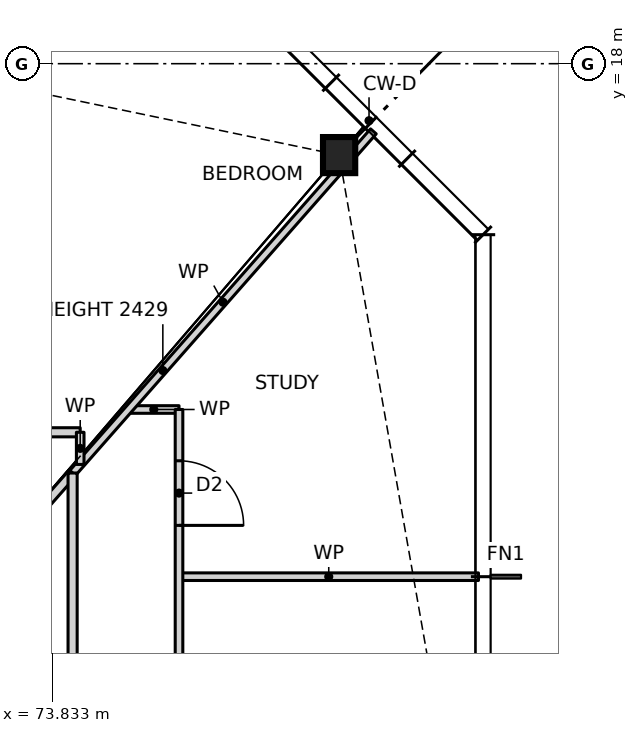
"""IFC4 building model, lengths in metres.
Left out: names, types, materials, properties, quantities, classifications, styles, units other than length and angle.
Written with IfcOpenShell. Run it as: python <this file> out.ifc"""

import sys

from ifc_helpers import new_model, si_unit, direction, frame, frame_2d, origin, origin_2d, place, context, subcontext, project, spatial, rectangle, i_section, extrude, element, fill, save


model = new_model("IFC4")
c1 = context("Model", 3, precision=1e-05, world=origin(), true_north=direction((0.0, 1.0)))
c2 = subcontext(c1, "Body", "Model", "MODEL_VIEW")
j1 = project(units=[si_unit("LENGTHUNIT", "METRE"), si_unit("PLANEANGLEUNIT", "RADIAN")], contexts=[c1])
p1 = place(None, origin())
s1 = spatial("IfcSite", under=j1, at=p1, CompositionType="ELEMENT")
p2 = place(p1, origin())
s2 = spatial("IfcBuilding", under=s1, at=p2, CompositionType="ELEMENT")
p3 = place(p2, frame((0.0, 0.0, 29.0)))
s3 = spatial("IfcBuildingStorey", under=s2, at=p3, CompositionType="ELEMENT", Elevation=29.0)
p4 = place(p3, frame((77.606, 16.797, 0.0), z_axis=(0.0, 0.0, 1.0), x_axis=(1.0, 0.0, 0.0)))
e1 = element("IfcColumn", 1, at=p4, inside=s3, PredefinedType="COLUMN", context=c2, shape_type="SweptSolid", body=[
    extrude(i_section(OverallWidth=0.424, OverallDepth=0.475, WebThickness=0.048, FlangeThickness=0.077, at=origin_2d()), origin(), (0.0, 0.0, 1.0), 3.5),
])
p5 = place(p3, frame((75.5, 11.25, 0.0), z_axis=(0.0, 0.0, 1.0), x_axis=(1.0, 0.0, 0.0)))
e2 = element("IfcWall", 2, at=p5, inside=s3, PredefinedType="PARTITIONING", context=c2, shape_type="SweptSolid", body=[
    extrude(rectangle(XDim=3.94, YDim=0.1, at=frame_2d((1.97, 0.0))), origin(), (0.0, 0.0, 1.0), 3.27),
])
p6 = place(p3, frame((67.5, 13.15, 0.0), z_axis=(0.0, 0.0, 1.0), x_axis=(1.0, 0.0, 0.0)))
e3 = element("IfcWall", 3, at=p6, inside=s3, PredefinedType="PARTITIONING", context=c2, shape_type="SweptSolid", body=[
    extrude(rectangle(XDim=6.7, YDim=0.12, at=frame_2d((3.35, 0.0))), origin(), (0.0, 0.0, 1.0), 3.27),
])
p7 = place(p6, frame((0.625, 0.0, 0.0)))
e4 = element("IfcOpeningElement", 4, at=p7, cuts=e3, PredefinedType="OPENING", context=c2, shape_type="SweptSolid", body=[
    extrude(rectangle(XDim=0.85, YDim=2.1, at=frame_2d((0.425, 1.05))), frame((0.0, 0.07, 0.0), z_axis=(0.0, -1.0, 0.0), x_axis=(1.0, 0.0, 0.0)), (0.0, 0.0, 1.0), 0.14),
])
p8 = place(p6, frame((5.175, 0.0, 0.0)))
e5 = element("IfcOpeningElement", 5, at=p8, cuts=e3, PredefinedType="OPENING", context=c2, shape_type="SweptSolid", body=[
    extrude(rectangle(XDim=0.85, YDim=2.1, at=frame_2d((0.425, 1.05))), frame((0.0, 0.07, 0.0), z_axis=(0.0, -1.0, 0.0), x_axis=(1.0, 0.0, 0.0)), (0.0, 0.0, 1.0), 0.14),
])
p9 = place(p3, frame((74.836, 13.45, 0.0), z_axis=(0.0, 0.0, 1.0), x_axis=(1.0, 0.0, 0.0)))
e6 = element("IfcWall", 6, at=p9, inside=s3, PredefinedType="PARTITIONING", context=c2, shape_type="SweptSolid", body=[
    extrude(rectangle(XDim=0.664, YDim=0.1, at=frame_2d((0.332, 0.0))), origin(), (0.0, 0.0, 1.0), 3.27),
])
p10 = place(p3, frame((74.1, 12.614, 0.0), z_axis=(0.0, 0.0, 1.0), x_axis=(0.660755619739, 0.750601099775, 0.0)))
e7 = element("IfcWall", 7, at=p10, inside=s3, PredefinedType="PARTITIONING", context=c2, shape_type="SweptSolid", body=[
    extrude(rectangle(XDim=5.989, YDim=0.1, at=frame_2d((2.995, 0.0))), origin(), (0.0, 0.0, 1.0), 2.429),
])
p11 = place(p3, frame((72.063, 10.301, 0.0), z_axis=(0.0, 0.0, 1.0), x_axis=(0.660761820138, 0.750595641506, 0.0)))
e8 = element("IfcWall", 8, at=p11, inside=s3, PredefinedType="PARTITIONING", context=c2, shape_type="SweptSolid", body=[
    extrude(rectangle(XDim=3.082, YDim=0.12, at=frame_2d((1.541, 0.0))), origin(), (0.0, 0.0, 1.0), 2.429),
])
p12 = place(p3, frame((75.5, 2.25, 0.0), z_axis=(0.0, 0.0, 1.0), x_axis=(0.0, 1.0, 0.0)))
e9 = element("IfcWall", 9, at=p12, inside=s3, PredefinedType="PARTITIONING", context=c2, shape_type="SweptSolid", body=[
    extrude(rectangle(XDim=11.2, YDim=0.1, at=frame_2d((5.6, 0.0))), origin(), (0.0, 0.0, 1.0), 3.27),
])
p13 = place(p12, frame((1.825, 0.0, 0.0)))
e10 = element("IfcOpeningElement", 10, at=p13, cuts=e9, PredefinedType="OPENING", context=c2, shape_type="SweptSolid", body=[
    extrude(rectangle(XDim=0.85, YDim=2.1, at=frame_2d((0.425, 1.05))), frame((0.0, 0.06, 0.0), z_axis=(0.0, -1.0, 0.0), x_axis=(1.0, 0.0, 0.0)), (0.0, 0.0, 1.0), 0.12),
])
p14 = place(p12, frame((6.325, 0.0, 0.0)))
e11 = element("IfcOpeningElement", 11, at=p14, cuts=e9, PredefinedType="OPENING", context=c2, shape_type="SweptSolid", body=[
    extrude(rectangle(XDim=0.85, YDim=2.1, at=frame_2d((0.425, 1.05))), frame((0.0, 0.06, 0.0), z_axis=(0.0, -1.0, 0.0), x_axis=(1.0, 0.0, 0.0)), (0.0, 0.0, 1.0), 0.12),
])
p15 = place(p12, frame((9.675, 0.0, 0.0)))
e12 = element("IfcOpeningElement", 12, at=p15, cuts=e9, PredefinedType="OPENING", context=c2, shape_type="SweptSolid", body=[
    extrude(rectangle(XDim=0.85, YDim=2.1, at=frame_2d((0.425, 1.05))), frame((0.0, 0.06, 0.0), z_axis=(0.0, -1.0, 0.0), x_axis=(1.0, 0.0, 0.0)), (0.0, 0.0, 1.0), 0.12),
])
p16 = place(p3, frame((74.2, 12.727, 0.0), z_axis=(0.0, 0.0, 1.0), x_axis=(0.0, 1.0, 0.0)))
e13 = element("IfcWall", 13, at=p16, inside=s3, PredefinedType="PARTITIONING", context=c2, shape_type="SweptSolid", body=[
    extrude(rectangle(XDim=0.423, YDim=0.1, at=frame_2d((0.211, 0.0))), origin(), (0.0, 0.0, 1.0), 3.27),
])
p17 = place(p3, frame((74.1, -12.614, 0.0), z_axis=(0.0, 0.0, 1.0), x_axis=(0.0, 1.0, 0.0)))
e14 = element("IfcWall", 14, at=p17, inside=s3, PredefinedType="PARTITIONING", context=c2, shape_type="SweptSolid", body=[
    extrude(rectangle(XDim=25.228, YDim=0.12, at=frame_2d((12.614, 0.0))), origin(), (0.0, 0.0, 1.0), 3.27),
])
p18 = place(p17, frame((7.239, 0.0, 0.0)))
e15 = element("IfcOpeningElement", 15, at=p18, cuts=e14, PredefinedType="OPENING", context=c2, shape_type="SweptSolid", body=[
    extrude(rectangle(XDim=0.85, YDim=2.1, at=frame_2d((0.425, 1.05))), frame((0.0, 0.07, 0.0), z_axis=(0.0, -1.0, 0.0), x_axis=(1.0, 0.0, 0.0)), (0.0, 0.0, 1.0), 0.14),
])
p19 = place(p17, frame((10.439, 0.0, 0.0)))
e16 = element("IfcOpeningElement", 16, at=p19, cuts=e14, PredefinedType="OPENING", context=c2, shape_type="SweptSolid", body=[
    extrude(rectangle(XDim=0.85, YDim=2.1, at=frame_2d((0.425, 1.05))), frame((0.0, 0.07, 0.0), z_axis=(0.0, -1.0, 0.0), x_axis=(1.0, 0.0, 0.0)), (0.0, 0.0, 1.0), 0.14),
])
p20 = place(p17, frame((2.507, 0.0, 0.0)))
e17 = element("IfcOpeningElement", 17, at=p20, cuts=e14, PredefinedType="OPENING", context=c2, shape_type="SweptSolid", body=[
    extrude(rectangle(XDim=0.85, YDim=2.1, at=frame_2d((0.425, 1.05))), frame((0.0, 0.07, 0.0), z_axis=(0.0, -1.0, 0.0), x_axis=(1.0, 0.0, 0.0)), (0.0, 0.0, 1.0), 0.14),
])
p21 = place(p17, frame((16.639, 0.0, 0.0)))
e18 = element("IfcOpeningElement", 18, at=p21, cuts=e14, PredefinedType="OPENING", context=c2, shape_type="SweptSolid", body=[
    extrude(rectangle(XDim=0.85, YDim=2.1, at=frame_2d((0.425, 1.05))), frame((0.0, 0.07, 0.0), z_axis=(0.0, -1.0, 0.0), x_axis=(1.0, 0.0, 0.0)), (0.0, 0.0, 1.0), 0.14),
])
p22 = place(p17, frame((21.821, 0.0, 0.0)))
e19 = element("IfcOpeningElement", 19, at=p22, cuts=e14, PredefinedType="OPENING", context=c2, shape_type="SweptSolid", body=[
    extrude(rectangle(XDim=0.85, YDim=2.1, at=frame_2d((0.425, 1.05))), frame((0.0, 0.07, 0.0), z_axis=(0.0, -1.0, 0.0), x_axis=(1.0, 0.0, 0.0)), (0.0, 0.0, 1.0), 0.14),
])
p23 = place(p15, frame((0.85, 0.0, 0.0), z_axis=(0.0, 0.0, 1.0), x_axis=(-1.0, 0.0, 0.0)))
e20 = element("IfcDoor", 20, at=p23, inside=s3, OperationType="SINGLE_SWING_RIGHT", PredefinedType="DOOR", context=c2, shape_type="SweptSolid", body=[
    extrude(rectangle(XDim=0.85, YDim=2.1, at=frame_2d((0.425, 1.05))), frame((0.0, 0.025, 0.0), z_axis=(0.0, -1.0, 0.0), x_axis=(1.0, 0.0, 0.0)), (0.0, 0.0, 1.0), 0.05),
])
fill(e12, e20)
save(model, sys.argv[1])
